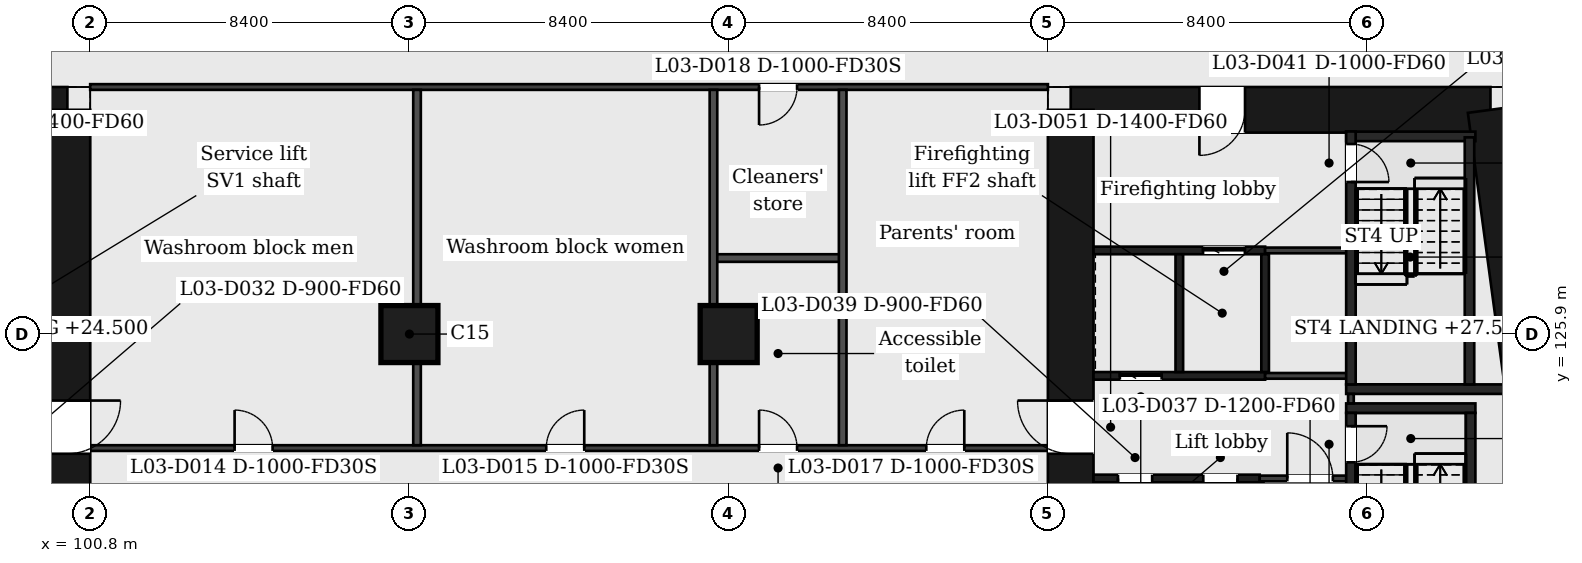
"""IFC4 building model, lengths in metres.
Left out: names, types, materials, properties, quantities, classifications, styles, units other than length and angle.
Written with IfcOpenShell. Run it as: python <this file> out.ifc"""

import sys

from ifc_helpers import new_model, si_unit, direction, frame, frame_2d, origin, origin_2d, place, context, subcontext, project, spatial, rectangle, extrude, element, fill, save


model = new_model("IFC4")
c1 = context("Model", 3, precision=1e-05, world=origin(), true_north=direction((0.0, 1.0)))
c2 = subcontext(c1, "Body", "Model", "MODEL_VIEW")
j1 = project(units=[si_unit("LENGTHUNIT", "METRE"), si_unit("PLANEANGLEUNIT", "RADIAN")], contexts=[c1])
p1 = place(None, origin())
s1 = spatial("IfcSite", under=j1, at=p1, CompositionType="ELEMENT")
p2 = place(p1, origin())
s2 = spatial("IfcBuilding", under=s1, at=p2, CompositionType="ELEMENT")
p3 = place(p2, frame((0.0, 0.0, 23.0)))
s3 = spatial("IfcBuildingStorey", under=s2, at=p3, CompositionType="ELEMENT", Elevation=23.0)
p4 = place(p3, frame((89.156, 131.8, 0.0), z_axis=(0.0, 0.0, 1.0), x_axis=(1.0, 0.0, 0.0)))
e1 = element("IfcWall", 1, at=p4, inside=s3, PredefinedType="SHEAR", context=c2, shape_type="SweptSolid", body=[
    extrude(rectangle(XDim=11.044, YDim=1.2, at=frame_2d((5.522, 0.0))), origin(), (0.0, 0.0, 1.0), 6.0),
])
p5 = place(p4, frame((6.458, 0.0, 0.0)))
e2 = element("IfcOpeningElement", 2, at=p5, cuts=e1, PredefinedType="OPENING", context=c2, shape_type="SweptSolid", body=[
    extrude(rectangle(XDim=1.2, YDim=2.1, at=frame_2d((0.6, 1.05))), frame((0.0, 0.61, 0.0), z_axis=(0.0, -1.0, 0.0), x_axis=(1.0, 0.0, 0.0)), (0.0, 0.0, 1.0), 1.22),
])
p6 = place(p3, frame((100.2, 131.8, 0.0), z_axis=(0.0, 0.0, 1.0), x_axis=(0.0, -1.0, 0.0)))
e3 = element("IfcWall", 3, at=p6, inside=s3, PredefinedType="SHEAR", context=c2, shape_type="SweptSolid", body=[
    extrude(rectangle(XDim=20.8, YDim=1.2, at=frame_2d((10.4, 0.0))), origin(), (0.0, 0.0, 1.0), 6.0),
])
p7 = place(p6, frame((7.65, 0.0, 0.0)))
e4 = element("IfcOpeningElement", 4, at=p7, cuts=e3, PredefinedType="OPENING", context=c2, shape_type="SweptSolid", body=[
    extrude(rectangle(XDim=1.4, YDim=2.1, at=frame_2d((0.7, 1.05))), frame((0.0, 0.61, 0.0), z_axis=(0.0, -1.0, 0.0), x_axis=(1.0, 0.0, 0.0)), (0.0, 0.0, 1.0), 1.22),
])
p8 = place(p3, frame((126.6, 131.8, 0.0), z_axis=(0.0, 0.0, 1.0), x_axis=(1.0, 0.0, 0.0)))
e5 = element("IfcWall", 5, at=p8, inside=s3, PredefinedType="SHEAR", context=c2, shape_type="SweptSolid", body=[
    extrude(rectangle(XDim=11.044, YDim=1.2, at=frame_2d((5.522, 0.0))), origin(), (0.0, 0.0, 1.0), 6.0),
])
p9 = place(p8, frame((3.386, 0.0, 0.0)))
e6 = element("IfcOpeningElement", 6, at=p9, cuts=e5, PredefinedType="OPENING", context=c2, shape_type="SweptSolid", body=[
    extrude(rectangle(XDim=1.2, YDim=2.1, at=frame_2d((0.6, 1.05))), frame((0.0, 0.61, 0.0), z_axis=(0.0, -1.0, 0.0), x_axis=(1.0, 0.0, 0.0)), (0.0, 0.0, 1.0), 1.22),
])
p10 = place(p3, frame((137.645, 131.8, 0.0), z_axis=(0.0, 0.0, 1.0), x_axis=(0.133413989637, -0.99106039542, 0.0)))
e7 = element("IfcWall", 7, at=p10, inside=s3, PredefinedType="SHEAR", context=c2, shape_type="SweptSolid", body=[
    extrude(rectangle(XDim=20.988, YDim=1.2, at=frame_2d((10.494, 0.0))), origin(), (0.0, 0.0, 1.0), 6.0),
])
p11 = place(p3, frame((126.6, 111.0, 0.0), z_axis=(0.0, 0.0, 1.0), x_axis=(0.0, 1.0, 0.0)))
e8 = element("IfcWall", 8, at=p11, inside=s3, PredefinedType="SHEAR", context=c2, shape_type="SweptSolid", body=[
    extrude(rectangle(XDim=20.8, YDim=1.2, at=frame_2d((10.4, 0.0))), origin(), (0.0, 0.0, 1.0), 6.0),
])
p12 = place(p11, frame((11.75, 0.0, 0.0)))
e9 = element("IfcOpeningElement", 9, at=p12, cuts=e8, PredefinedType="OPENING", context=c2, shape_type="SweptSolid", body=[
    extrude(rectangle(XDim=1.4, YDim=2.1, at=frame_2d((0.7, 1.05))), frame((0.0, 0.61, 0.0), z_axis=(0.0, -1.0, 0.0), x_axis=(1.0, 0.0, 0.0)), (0.0, 0.0, 1.0), 1.22),
])
for number, where, z_axis, x_axis in (
    (10, (109.2, 125.9, 0.0), (0.0, 0.0, 1.0), (1.0, 0.0, 0.0)),
    (11, (117.6, 125.9, 0.0), (0.0, 0.0, 1.0), (1.0, 0.0, 0.0)),
):
    element("IfcColumn", number, at=place(p3, frame(where, z_axis=z_axis, x_axis=x_axis)), inside=s3, PredefinedType="COLUMN", context=c2, shape_type="SweptSolid", body=[
        extrude(rectangle(XDim=1.5, YDim=1.5, at=origin_2d()), origin(), (0.0, 0.0, 1.0), 6.0),
    ])
p13 = place(p3, frame((127.2, 122.1, 0.0), z_axis=(0.0, 0.0, 1.0), x_axis=(1.0, 0.0, 0.0)))
e12 = element("IfcWall", 12, at=p13, inside=s3, PredefinedType="PARTITIONING", context=c2, shape_type="SweptSolid", body=[
    extrude(rectangle(XDim=4.373, YDim=0.2, at=frame_2d((2.187, 0.0))), origin(), (0.0, 0.0, 1.0), 5.5),
])
p14 = place(p13, frame((2.888, 0.0, 0.0)))
e13 = element("IfcOpeningElement", 13, at=p14, cuts=e12, PredefinedType="OPENING", context=c2, shape_type="SweptSolid", body=[
    extrude(rectangle(XDim=0.9, YDim=2.1, at=frame_2d((0.45, 1.05))), frame((0.0, 0.11, 0.0), z_axis=(0.0, -1.0, 0.0), x_axis=(1.0, 0.0, 0.0)), (0.0, 0.0, 1.0), 0.22),
])
p15 = place(p13, frame((0.643, 0.0, 0.0)))
e14 = element("IfcOpeningElement", 14, at=p15, cuts=e12, PredefinedType="OPENING", context=c2, shape_type="SweptSolid", body=[
    extrude(rectangle(XDim=0.9, YDim=2.1, at=frame_2d((0.45, 1.05))), frame((0.0, 0.11, 0.0), z_axis=(0.0, -1.0, 0.0), x_axis=(1.0, 0.0, 0.0)), (0.0, 0.0, 1.0), 0.22),
])
p16 = place(p3, frame((131.573, 122.1, 0.0), z_axis=(0.0, 0.0, 1.0), x_axis=(1.0, 0.0, 0.0)))
e15 = element("IfcWall", 15, at=p16, inside=s3, PredefinedType="PARTITIONING", context=c2, shape_type="SweptSolid", body=[
    extrude(rectangle(XDim=2.4, YDim=0.15, at=frame_2d((1.2, 0.0))), origin(), (0.0, 0.0, 1.0), 5.5),
])
p17 = place(p16, frame((0.725, 0.0, 0.0)))
e16 = element("IfcOpeningElement", 16, at=p17, cuts=e15, PredefinedType="OPENING", context=c2, shape_type="SweptSolid", body=[
    extrude(rectangle(XDim=1.2, YDim=2.1, at=frame_2d((0.6, 1.05))), frame((0.0, 0.085, 0.0), z_axis=(0.0, -1.0, 0.0), x_axis=(1.0, 0.0, 0.0)), (0.0, 0.0, 1.0), 0.17),
])
p18 = place(p3, frame((100.8, 122.9, 0.0), z_axis=(0.0, 0.0, 1.0), x_axis=(1.0, 0.0, 0.0)))
e17 = element("IfcWall", 17, at=p18, inside=s3, PredefinedType="PARTITIONING", context=c2, shape_type="SweptSolid", body=[
    extrude(rectangle(XDim=25.2, YDim=0.15, at=frame_2d((12.6, 0.0))), origin(), (0.0, 0.0, 1.0), 5.5),
])
p19 = place(p18, frame((3.8, 0.0, 0.0)))
e18 = element("IfcOpeningElement", 18, at=p19, cuts=e17, PredefinedType="OPENING", context=c2, shape_type="SweptSolid", body=[
    extrude(rectangle(XDim=1.0, YDim=2.1, at=frame_2d((0.5, 1.05))), frame((0.0, 0.085, 0.0), z_axis=(0.0, -1.0, 0.0), x_axis=(1.0, 0.0, 0.0)), (0.0, 0.0, 1.0), 0.17),
])
p20 = place(p18, frame((12.0, 0.0, 0.0)))
e19 = element("IfcOpeningElement", 19, at=p20, cuts=e17, PredefinedType="OPENING", context=c2, shape_type="SweptSolid", body=[
    extrude(rectangle(XDim=1.0, YDim=2.1, at=frame_2d((0.5, 1.05))), frame((0.0, 0.085, 0.0), z_axis=(0.0, -1.0, 0.0), x_axis=(1.0, 0.0, 0.0)), (0.0, 0.0, 1.0), 0.17),
])
p21 = place(p18, frame((17.6, 0.0, 0.0)))
e20 = element("IfcOpeningElement", 20, at=p21, cuts=e17, PredefinedType="OPENING", context=c2, shape_type="SweptSolid", body=[
    extrude(rectangle(XDim=1.0, YDim=2.1, at=frame_2d((0.5, 1.05))), frame((0.0, 0.085, 0.0), z_axis=(0.0, -1.0, 0.0), x_axis=(1.0, 0.0, 0.0)), (0.0, 0.0, 1.0), 0.17),
])
p22 = place(p18, frame((22.0, 0.0, 0.0)))
e21 = element("IfcOpeningElement", 21, at=p22, cuts=e17, PredefinedType="OPENING", context=c2, shape_type="SweptSolid", body=[
    extrude(rectangle(XDim=1.0, YDim=2.1, at=frame_2d((0.5, 1.05))), frame((0.0, 0.085, 0.0), z_axis=(0.0, -1.0, 0.0), x_axis=(1.0, 0.0, 0.0)), (0.0, 0.0, 1.0), 0.17),
])
p23 = place(p3, frame((133.848, 123.95, 0.0), z_axis=(0.0, 0.0, 1.0), x_axis=(1.0, 0.0, 0.0)))
e22 = element("IfcWall", 22, at=p23, inside=s3, PredefinedType="PARTITIONING", context=c2, shape_type="SweptSolid", body=[
    extrude(rectangle(XDim=3.4, YDim=0.25, at=frame_2d((1.7, 0.0))), origin(), (0.0, 0.0, 1.0), 5.5),
])
p24 = place(p3, frame((133.848, 124.45, 0.0), z_axis=(0.0, 0.0, 1.0), x_axis=(1.0, 0.0, 0.0)))
e23 = element("IfcWall", 23, at=p24, inside=s3, PredefinedType="PARTITIONING", context=c2, shape_type="SweptSolid", body=[
    extrude(rectangle(XDim=4.211, YDim=0.25, at=frame_2d((2.105, 0.0))), origin(), (0.0, 0.0, 1.0), 5.5),
])
p25 = place(p3, frame((127.2, 124.8, 0.0), z_axis=(0.0, 0.0, 1.0), x_axis=(1.0, 0.0, 0.0)))
e24 = element("IfcWall", 24, at=p25, inside=s3, PredefinedType="PARTITIONING", context=c2, shape_type="SweptSolid", body=[
    extrude(rectangle(XDim=4.515, YDim=0.2, at=frame_2d((2.258, 0.0))), origin(), (0.0, 0.0, 1.0), 5.5),
])
p26 = place(p25, frame((0.693, 0.0, 0.0)))
e25 = element("IfcOpeningElement", 25, at=p26, cuts=e24, PredefinedType="OPENING", context=c2, shape_type="SweptSolid", body=[
    extrude(rectangle(XDim=1.1, YDim=2.1, at=frame_2d((0.55, 1.05))), frame((0.0, 0.11, 0.0), z_axis=(0.0, -1.0, 0.0), x_axis=(1.0, 0.0, 0.0)), (0.0, 0.0, 1.0), 0.22),
])
p27 = place(p3, frame((131.715, 124.8, 0.0), z_axis=(0.0, 0.0, 1.0), x_axis=(1.0, 0.0, 0.0)))
e26 = element("IfcWall", 26, at=p27, inside=s3, PredefinedType="PARTITIONING", context=c2, shape_type="SweptSolid", body=[
    extrude(rectangle(XDim=2.383, YDim=0.15, at=frame_2d((1.191, 0.0))), origin(), (0.0, 0.0, 1.0), 5.5),
])
p28 = place(p3, frame((117.2, 127.9, 0.0), z_axis=(0.0, 0.0, 1.0), x_axis=(1.0, 0.0, 0.0)))
e27 = element("IfcWall", 27, at=p28, inside=s3, PredefinedType="PARTITIONING", context=c2, shape_type="SweptSolid", body=[
    extrude(rectangle(XDim=3.4, YDim=0.2, at=frame_2d((1.7, 0.0))), origin(), (0.0, 0.0, 1.0), 5.5),
])
p29 = place(p3, frame((127.2, 128.1, 0.0), z_axis=(0.0, 0.0, 1.0), x_axis=(1.0, 0.0, 0.0)))
e28 = element("IfcWall", 28, at=p29, inside=s3, PredefinedType="PARTITIONING", context=c2, shape_type="SweptSolid", body=[
    extrude(rectangle(XDim=4.515, YDim=0.2, at=frame_2d((2.258, 0.0))), origin(), (0.0, 0.0, 1.0), 5.5),
])
p30 = place(p29, frame((2.882, 0.0, 0.0)))
e29 = element("IfcOpeningElement", 29, at=p30, cuts=e28, PredefinedType="OPENING", context=c2, shape_type="SweptSolid", body=[
    extrude(rectangle(XDim=1.1, YDim=2.1, at=frame_2d((0.55, 1.05))), frame((0.0, 0.11, 0.0), z_axis=(0.0, -1.0, 0.0), x_axis=(1.0, 0.0, 0.0)), (0.0, 0.0, 1.0), 0.22),
])
p31 = place(p3, frame((131.715, 128.1, 0.0), z_axis=(0.0, 0.0, 1.0), x_axis=(1.0, 0.0, 0.0)))
e30 = element("IfcWall", 30, at=p31, inside=s3, PredefinedType="PARTITIONING", context=c2, shape_type="SweptSolid", body=[
    extrude(rectangle(XDim=2.258, YDim=0.15, at=frame_2d((1.129, 0.0))), origin(), (0.0, 0.0, 1.0), 5.5),
])
p32 = place(p3, frame((133.848, 131.101, 0.0), z_axis=(0.0, 0.0, 1.0), x_axis=(1.0, 0.0, 0.0)))
e31 = element("IfcWall", 31, at=p32, inside=s3, PredefinedType="PARTITIONING", context=c2, shape_type="SweptSolid", body=[
    extrude(rectangle(XDim=3.4, YDim=0.25, at=frame_2d((1.7, 0.0))), origin(), (0.0, 0.0, 1.0), 5.5),
])
p33 = place(p3, frame((100.8, 132.4, 0.0), z_axis=(0.0, 0.0, 1.0), x_axis=(1.0, 0.0, 0.0)))
e32 = element("IfcWall", 32, at=p33, inside=s3, PredefinedType="PARTITIONING", context=c2, shape_type="SweptSolid", body=[
    extrude(rectangle(XDim=25.2, YDim=0.15, at=frame_2d((12.6, 0.0))), origin(), (0.0, 0.0, 1.0), 5.5),
])
p34 = place(p33, frame((17.6, 0.0, 0.0)))
e33 = element("IfcOpeningElement", 33, at=p34, cuts=e32, PredefinedType="OPENING", context=c2, shape_type="SweptSolid", body=[
    extrude(rectangle(XDim=1.0, YDim=2.1, at=frame_2d((0.5, 1.05))), frame((0.0, 0.085, 0.0), z_axis=(0.0, -1.0, 0.0), x_axis=(1.0, 0.0, 0.0)), (0.0, 0.0, 1.0), 0.17),
])
for number, where, z_axis, x_axis in (
    (34, (109.4, 122.975, 0.0), (0.0, 0.0, 1.0), (0.0, 1.0, 0.0)),
    (35, (117.2, 122.975, 0.0), (0.0, 0.0, 1.0), (0.0, 1.0, 0.0)),
    (36, (120.6, 122.975, 0.0), (0.0, 0.0, 1.0), (0.0, 1.0, 0.0)),
):
    element("IfcWall", number, at=place(p3, frame(where, z_axis=z_axis, x_axis=x_axis)), inside=s3, PredefinedType="PARTITIONING", context=c2, shape_type="SweptSolid", body=[
        extrude(rectangle(XDim=9.35, YDim=0.2, at=frame_2d((4.675, 0.0))), origin(), (0.0, 0.0, 1.0), 5.5),
    ])
for number, where, z_axis, x_axis in (
    (37, (129.386, 118.9, 0.0), (0.0, 0.0, 1.0), (0.0, 1.0, 0.0)),
    (38, (129.458, 124.9, 0.0), (0.0, 0.0, 1.0), (0.0, 1.0, 0.0)),
):
    element("IfcWall", number, at=place(p3, frame(where, z_axis=z_axis, x_axis=x_axis)), inside=s3, PredefinedType="PARTITIONING", context=c2, shape_type="SweptSolid", body=[
        extrude(rectangle(XDim=3.1, YDim=0.2, at=frame_2d((1.55, 0.0))), origin(), (0.0, 0.0, 1.0), 5.5),
    ])
p35 = place(p3, frame((131.573, 117.2, 0.0), z_axis=(0.0, 0.0, 1.0), x_axis=(0.0, 1.0, 0.0)))
e39 = element("IfcWall", 39, at=p35, inside=s3, PredefinedType="PARTITIONING", context=c2, shape_type="SweptSolid", body=[
    extrude(rectangle(XDim=4.8, YDim=0.2, at=frame_2d((2.4, 0.0))), origin(), (0.0, 0.0, 1.0), 5.5),
])
p36 = place(p35, frame((0.35, 0.0, 0.0)))
e40 = element("IfcOpeningElement", 40, at=p36, cuts=e39, PredefinedType="OPENING", context=c2, shape_type="SweptSolid", body=[
    extrude(rectangle(XDim=0.9, YDim=2.1, at=frame_2d((0.45, 1.05))), frame((0.0, 0.11, 0.0), z_axis=(0.0, -1.0, 0.0), x_axis=(1.0, 0.0, 0.0)), (0.0, 0.0, 1.0), 0.22),
])
p37 = place(p3, frame((131.715, 124.9, 0.0), z_axis=(0.0, 0.0, 1.0), x_axis=(0.0, 1.0, 0.0)))
e41 = element("IfcWall", 41, at=p37, inside=s3, PredefinedType="PARTITIONING", context=c2, shape_type="SweptSolid", body=[
    extrude(rectangle(XDim=3.1, YDim=0.2, at=frame_2d((1.55, 0.0))), origin(), (0.0, 0.0, 1.0), 5.5),
])
p38 = place(p3, frame((133.973, 124.075, 0.0), z_axis=(0.0, 0.0, 1.0), x_axis=(0.0, 1.0, 0.0)))
e42 = element("IfcWall", 42, at=p38, inside=s3, PredefinedType="PARTITIONING", context=c2, shape_type="SweptSolid", body=[
    extrude(rectangle(XDim=0.25, YDim=0.15, at=frame_2d((0.125, 0.0))), origin(), (0.0, 0.0, 1.0), 5.5),
])
p39 = place(p3, frame((133.973, 117.17, 0.0), z_axis=(0.0, 0.0, 1.0), x_axis=(0.0, 1.0, 0.0)))
e43 = element("IfcWall", 43, at=p39, inside=s3, PredefinedType="PARTITIONING", context=c2, shape_type="SweptSolid", body=[
    extrude(rectangle(XDim=6.655, YDim=0.25, at=frame_2d((3.328, 0.0))), origin(), (0.0, 0.0, 1.0), 5.5),
])
p40 = place(p39, frame((5.355, 0.0, 0.0)))
e44 = element("IfcOpeningElement", 44, at=p40, cuts=e43, PredefinedType="OPENING", context=c2, shape_type="SweptSolid", body=[
    extrude(rectangle(XDim=0.95, YDim=2.1, at=frame_2d((0.475, 1.05))), frame((0.0, 0.135, 0.0), z_axis=(0.0, -1.0, 0.0), x_axis=(1.0, 0.0, 0.0)), (0.0, 0.0, 1.0), 0.27),
])
p41 = place(p3, frame((133.973, 124.575, 0.0), z_axis=(0.0, 0.0, 1.0), x_axis=(0.0, 1.0, 0.0)))
e45 = element("IfcWall", 45, at=p41, inside=s3, PredefinedType="PARTITIONING", context=c2, shape_type="SweptSolid", body=[
    extrude(rectangle(XDim=6.655, YDim=0.25, at=frame_2d((3.328, 0.0))), origin(), (0.0, 0.0, 1.0), 5.5),
])
p42 = place(p41, frame((5.325, 0.0, 0.0)))
e46 = element("IfcOpeningElement", 46, at=p42, cuts=e45, PredefinedType="OPENING", context=c2, shape_type="SweptSolid", body=[
    extrude(rectangle(XDim=1.0, YDim=2.1, at=frame_2d((0.5, 1.05))), frame((0.0, 0.135, 0.0), z_axis=(0.0, -1.0, 0.0), x_axis=(1.0, 0.0, 0.0)), (0.0, 0.0, 1.0), 0.27),
])
p43 = place(p3, frame((137.123, 117.17, 0.0), z_axis=(0.0, 0.0, 1.0), x_axis=(0.0, 1.0, 0.0)))
e47 = element("IfcWall", 47, at=p43, inside=s3, PredefinedType="PARTITIONING", context=c2, shape_type="SweptSolid", body=[
    extrude(rectangle(XDim=6.655, YDim=0.25, at=frame_2d((3.328, 0.0))), origin(), (0.0, 0.0, 1.0), 5.5),
])
p44 = place(p3, frame((137.093, 124.575, 0.0), z_axis=(0.0, 0.0, 1.0), x_axis=(0.0, 1.0, 0.0)))
e48 = element("IfcWall", 48, at=p44, inside=s3, PredefinedType="PARTITIONING", context=c2, shape_type="SweptSolid", body=[
    extrude(rectangle(XDim=6.5, YDim=0.25, at=frame_2d((3.25, 0.0))), origin(), (0.0, 0.0, 1.0), 5.5),
])
p45 = place(p19, origin())
e49 = element("IfcDoor", 49, at=p45, inside=s3, OperationType="SINGLE_SWING_LEFT", PredefinedType="DOOR", context=c2, shape_type="SweptSolid", body=[
    extrude(rectangle(XDim=1.0, YDim=2.1, at=frame_2d((0.5, 1.05))), frame((0.0, 0.025, 0.0), z_axis=(0.0, -1.0, 0.0), x_axis=(1.0, 0.0, 0.0)), (0.0, 0.0, 1.0), 0.05),
])
fill(e18, e49)
p46 = place(p20, origin())
e50 = element("IfcDoor", 50, at=p46, inside=s3, OperationType="SINGLE_SWING_RIGHT", PredefinedType="DOOR", context=c2, shape_type="SweptSolid", body=[
    extrude(rectangle(XDim=1.0, YDim=2.1, at=frame_2d((0.5, 1.05))), frame((0.0, 0.025, 0.0), z_axis=(0.0, -1.0, 0.0), x_axis=(1.0, 0.0, 0.0)), (0.0, 0.0, 1.0), 0.05),
])
fill(e19, e50)
p47 = place(p21, origin())
e51 = element("IfcDoor", 51, at=p47, inside=s3, OperationType="SINGLE_SWING_LEFT", PredefinedType="DOOR", context=c2, shape_type="SweptSolid", body=[
    extrude(rectangle(XDim=1.0, YDim=2.1, at=frame_2d((0.5, 1.05))), frame((0.0, 0.025, 0.0), z_axis=(0.0, -1.0, 0.0), x_axis=(1.0, 0.0, 0.0)), (0.0, 0.0, 1.0), 0.05),
])
fill(e20, e51)
p48 = place(p22, origin())
e52 = element("IfcDoor", 52, at=p48, inside=s3, OperationType="SINGLE_SWING_RIGHT", PredefinedType="DOOR", context=c2, shape_type="SweptSolid", body=[
    extrude(rectangle(XDim=1.0, YDim=2.1, at=frame_2d((0.5, 1.05))), frame((0.0, 0.025, 0.0), z_axis=(0.0, -1.0, 0.0), x_axis=(1.0, 0.0, 0.0)), (0.0, 0.0, 1.0), 0.05),
])
fill(e21, e52)
p49 = place(p34, origin())
e53 = element("IfcDoor", 53, at=p49, inside=s3, OperationType="SINGLE_SWING_LEFT", PredefinedType="DOOR", context=c2, shape_type="SweptSolid", body=[
    extrude(rectangle(XDim=1.0, YDim=2.1, at=frame_2d((0.5, 1.05))), frame((0.0, 0.025, 0.0), z_axis=(0.0, -1.0, 0.0), x_axis=(1.0, 0.0, 0.0)), (0.0, 0.0, 1.0), 0.05),
])
fill(e33, e53)
p50 = place(p17, origin())
e54 = element("IfcDoor", 54, at=p50, inside=s3, OperationType="SINGLE_SWING_LEFT", PredefinedType="DOOR", context=c2, shape_type="SweptSolid", body=[
    extrude(rectangle(XDim=1.2, YDim=2.1, at=frame_2d((0.6, 1.05))), frame((0.0, 0.025, 0.0), z_axis=(0.0, -1.0, 0.0), x_axis=(1.0, 0.0, 0.0)), (0.0, 0.0, 1.0), 0.05),
])
fill(e16, e54)
p51 = place(p30, origin())
e55 = element("IfcDoor", 55, at=p51, inside=s3, OperationType="SLIDING_TO_LEFT", PredefinedType="DOOR", context=c2, shape_type="SweptSolid", body=[
    extrude(rectangle(XDim=1.1, YDim=2.1, at=frame_2d((0.55, 1.05))), frame((0.0, 0.025, 0.0), z_axis=(0.0, -1.0, 0.0), x_axis=(1.0, 0.0, 0.0)), (0.0, 0.0, 1.0), 0.05),
])
fill(e29, e55)
p52 = place(p26, origin())
e56 = element("IfcDoor", 56, at=p52, inside=s3, OperationType="SLIDING_TO_LEFT", PredefinedType="DOOR", context=c2, shape_type="SweptSolid", body=[
    extrude(rectangle(XDim=1.1, YDim=2.1, at=frame_2d((0.55, 1.05))), frame((0.0, 0.025, 0.0), z_axis=(0.0, -1.0, 0.0), x_axis=(1.0, 0.0, 0.0)), (0.0, 0.0, 1.0), 0.05),
])
fill(e25, e56)
p53 = place(p14, origin())
e57 = element("IfcDoor", 57, at=p53, inside=s3, OperationType="SINGLE_SWING_RIGHT", PredefinedType="DOOR", context=c2, shape_type="SweptSolid", body=[
    extrude(rectangle(XDim=0.9, YDim=2.1, at=frame_2d((0.45, 1.05))), frame((0.0, 0.025, 0.0), z_axis=(0.0, -1.0, 0.0), x_axis=(1.0, 0.0, 0.0)), (0.0, 0.0, 1.0), 0.05),
])
fill(e13, e57)
p54 = place(p15, origin())
e58 = element("IfcDoor", 58, at=p54, inside=s3, OperationType="SINGLE_SWING_LEFT", PredefinedType="DOOR", context=c2, shape_type="SweptSolid", body=[
    extrude(rectangle(XDim=0.9, YDim=2.1, at=frame_2d((0.45, 1.05))), frame((0.0, 0.025, 0.0), z_axis=(0.0, -1.0, 0.0), x_axis=(1.0, 0.0, 0.0)), (0.0, 0.0, 1.0), 0.05),
])
fill(e14, e58)
p55 = place(p40, origin())
e59 = element("IfcDoor", 59, at=p55, inside=s3, OperationType="SINGLE_SWING_RIGHT", PredefinedType="DOOR", context=c2, shape_type="SweptSolid", body=[
    extrude(rectangle(XDim=0.95, YDim=2.1, at=frame_2d((0.475, 1.05))), frame((0.0, 0.025, 0.0), z_axis=(0.0, -1.0, 0.0), x_axis=(1.0, 0.0, 0.0)), (0.0, 0.0, 1.0), 0.05),
])
fill(e44, e59)
p56 = place(p42, origin())
e60 = element("IfcDoor", 60, at=p56, inside=s3, OperationType="SINGLE_SWING_LEFT", PredefinedType="DOOR", context=c2, shape_type="SweptSolid", body=[
    extrude(rectangle(XDim=1.0, YDim=2.1, at=frame_2d((0.5, 1.05))), frame((0.0, 0.025, 0.0), z_axis=(0.0, -1.0, 0.0), x_axis=(1.0, 0.0, 0.0)), (0.0, 0.0, 1.0), 0.05),
])
fill(e46, e60)
p57 = place(p7, origin())
e61 = element("IfcDoor", 61, at=p57, inside=s3, OperationType="SINGLE_SWING_LEFT", PredefinedType="DOOR", context=c2, shape_type="SweptSolid", body=[
    extrude(rectangle(XDim=1.4, YDim=2.1, at=frame_2d((0.7, 1.05))), frame((0.0, 0.025, 0.0), z_axis=(0.0, -1.0, 0.0), x_axis=(1.0, 0.0, 0.0)), (0.0, 0.0, 1.0), 0.05),
])
fill(e4, e61)
p58 = place(p9, origin())
e62 = element("IfcDoor", 62, at=p58, inside=s3, OperationType="SINGLE_SWING_LEFT", PredefinedType="DOOR", context=c2, shape_type="SweptSolid", body=[
    extrude(rectangle(XDim=1.2, YDim=2.1, at=frame_2d((0.6, 1.05))), frame((0.0, 0.025, 0.0), z_axis=(0.0, -1.0, 0.0), x_axis=(1.0, 0.0, 0.0)), (0.0, 0.0, 1.0), 0.05),
])
fill(e6, e62)
p59 = place(p12, origin())
e63 = element("IfcDoor", 63, at=p59, inside=s3, OperationType="SINGLE_SWING_RIGHT", PredefinedType="DOOR", context=c2, shape_type="SweptSolid", body=[
    extrude(rectangle(XDim=1.4, YDim=2.1, at=frame_2d((0.7, 1.05))), frame((0.0, 0.025, 0.0), z_axis=(0.0, -1.0, 0.0), x_axis=(1.0, 0.0, 0.0)), (0.0, 0.0, 1.0), 0.05),
])
fill(e9, e63)
save(model, sys.argv[1])
